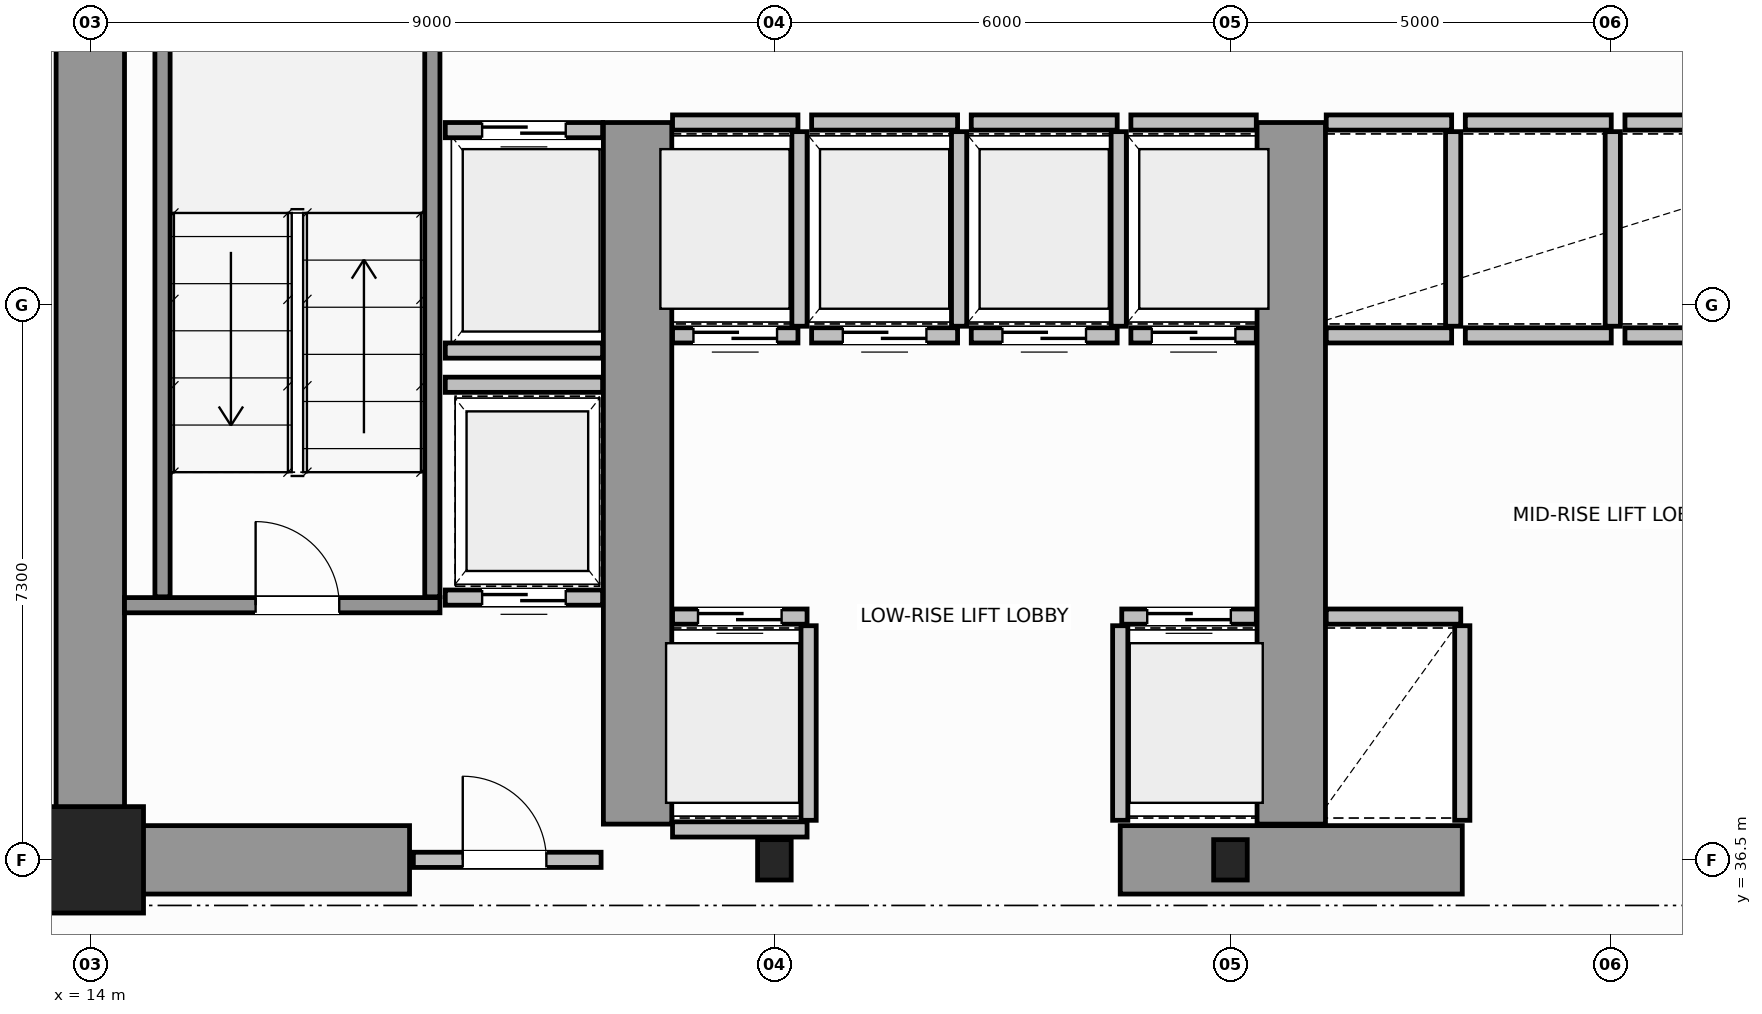
"""IFC4 building model, lengths in metres.
Left out: names, types, materials, properties, quantities, classifications, styles, units other than length and angle.
Written with IfcOpenShell. Run it as: python <this file> out.ifc"""

import sys

from ifc_helpers import new_model, si_unit, direction, frame, frame_2d, origin, origin_2d, place, context, subcontext, project, spatial, rectangle, i_section, extrude, source, transform, mapped, element, fill, save


model = new_model("IFC4")
c1 = context("Model", 3, precision=1e-05, world=origin(), true_north=direction((0.0, 1.0)))
c2 = subcontext(c1, "Body", "Model", "MODEL_VIEW")
j1 = project(units=[si_unit("LENGTHUNIT", "METRE"), si_unit("PLANEANGLEUNIT", "RADIAN")], contexts=[c1])
p1 = place(None, origin())
s1 = spatial("IfcSite", under=j1, at=p1, CompositionType="ELEMENT")
p2 = place(p1, origin())
s2 = spatial("IfcBuilding", under=s1, at=p2, CompositionType="ELEMENT")
p3 = place(p2, frame((0.0, 0.0, 72.0)))
s3 = spatial("IfcBuildingStorey", under=s2, at=p3, CompositionType="ELEMENT", Elevation=72.0)
m1 = source(origin(), c2, "Body", "SweptSolid", [
    extrude(rectangle(XDim=1.4, YDim=1.4, at=origin_2d()), origin(), (0.0, 0.0, 1.0), 3.8),
])
p4 = place(p3, frame((14.0, 36.5, 0.0), z_axis=(0.0, 0.0, 1.0), x_axis=(1.0, 0.0, 0.0)))
e1 = element("IfcColumn", 1, at=p4, inside=s3, PredefinedType="COLUMN", context=c2, shape_type="MappedRepresentation", body=[
    mapped(m1, transform((0.0, 0.0, 0.0), scale=1.0)),
])
m2 = source(origin(), c2, "Body", "SweptSolid", [
    extrude(i_section(OverallWidth=0.442, OverallDepth=0.531, WebThickness=0.065, FlangeThickness=0.076, FilletRadius=0.015, at=origin_2d()), origin(), (0.0, 0.0, 1.0), 3.8),
])
for number, where, z_axis, x_axis in (
    (2, (23.0, 36.5, 0.0), (0.0, 0.0, 1.0), (1.0, 0.0, 0.0)),
    (3, (29.0, 36.5, 0.0), (0.0, 0.0, 1.0), (1.0, 0.0, 0.0)),
):
    element("IfcColumn", number, at=place(p3, frame(where, z_axis=z_axis, x_axis=x_axis)), inside=s3, PredefinedType="COLUMN", context=c2, shape_type="MappedRepresentation", body=[
        mapped(m2, transform((0.0, 0.0, 0.0), scale=1.0)),
    ])
p5 = place(p3, frame((14.0, 36.5, 0.0), z_axis=(0.0, 0.0, 1.0), x_axis=(0.0, 1.0, 0.0)))
e4 = element("IfcWall", 4, at=p5, inside=s3, PredefinedType="SHEAR", context=c2, shape_type="SweptSolid", body=[
    extrude(rectangle(XDim=14.5, YDim=0.9, at=frame_2d((7.25, 0.0))), origin(), (0.0, 0.0, 1.0), 3.8),
])
p6 = place(p3, frame((14.47, 36.5, 0.0), z_axis=(0.0, 0.0, 1.0), x_axis=(1.0, 0.0, 0.0)))
e5 = element("IfcWall", 5, at=p6, inside=s3, PredefinedType="SHEAR", context=c2, shape_type="SweptSolid", body=[
    extrude(rectangle(XDim=3.73, YDim=0.9, at=frame_2d((1.865, 0.0))), origin(), (0.0, 0.0, 1.0), 2.38),
])
p7 = place(p3, frame((27.55, 36.5, 0.0), z_axis=(0.0, 0.0, 1.0), x_axis=(1.0, 0.0, 0.0)))
e6 = element("IfcWall", 6, at=p7, inside=s3, PredefinedType="SHEAR", context=c2, shape_type="SweptSolid", body=[
    extrude(rectangle(XDim=4.5, YDim=0.9, at=frame_2d((2.25, 0.0))), origin(), (0.0, 0.0, 1.0), 3.8),
])
for number, where, z_axis, x_axis in (
    (7, (21.2, 36.97, 0.0), (0.0, 0.0, 1.0), (0.0, 1.0, 0.0)),
    (8, (29.8, 36.97, 0.0), (0.0, 0.0, 1.0), (0.0, 1.0, 0.0)),
):
    element("IfcWall", number, at=place(p3, frame(where, z_axis=z_axis, x_axis=x_axis)), inside=s3, PredefinedType="SHEAR", context=c2, shape_type="SweptSolid", body=[
        extrude(rectangle(XDim=9.23, YDim=0.9, at=frame_2d((4.615, 0.0))), origin(), (0.0, 0.0, 1.0), 3.8),
    ])
p8 = place(p3, frame((14.45, 39.85, 0.0), z_axis=(0.0, 0.0, 1.0), x_axis=(1.0, 0.0, 0.0)))
e9 = element("IfcWall", 9, at=p8, inside=s3, PredefinedType="SOLIDWALL", context=c2, shape_type="SweptSolid", body=[
    extrude(rectangle(XDim=4.15, YDim=0.2, at=frame_2d((2.075, 0.0))), origin(), (0.0, 0.0, 1.0), 3.8),
])
p9 = place(p8, frame((1.725, 0.0, 0.0)))
e10 = element("IfcOpeningElement", 10, at=p9, cuts=e9, PredefinedType="OPENING", context=c2, shape_type="SweptSolid", body=[
    extrude(rectangle(XDim=1.1, YDim=2.15, at=frame_2d((0.55, 1.075))), frame((0.0, 0.11, 0.0), z_axis=(0.0, -1.0, 0.0), x_axis=(1.0, 0.0, 0.0)), (0.0, 0.0, 1.0), 0.22),
])
for number, where, z_axis, x_axis in (
    (11, (14.95, 39.96, 0.0), (0.0, 0.0, 1.0), (0.0, 1.0, 0.0)),
    (12, (18.5, 39.96, 0.0), (0.0, 0.0, 1.0), (0.0, 1.0, 0.0)),
):
    element("IfcWall", number, at=place(p3, frame(where, z_axis=z_axis, x_axis=x_axis)), inside=s3, PredefinedType="SOLIDWALL", context=c2, shape_type="SweptSolid", body=[
        extrude(rectangle(XDim=9.93, YDim=0.2, at=frame_2d((4.965, 0.0))), origin(), (0.0, 0.0, 1.0), 3.8),
    ])
p10 = place(p3, frame((18.25, 36.5, 0.0), z_axis=(0.0, 0.0, 1.0), x_axis=(1.0, 0.0, 0.0)))
e13 = element("IfcWall", 13, at=p10, inside=s3, PredefinedType="SOLIDWALL", context=c2, shape_type="SweptSolid", body=[
    extrude(rectangle(XDim=2.47, YDim=0.2, at=frame_2d((1.235, 0.0))), origin(), (0.0, 0.0, 1.0), 2.37),
])
p11 = place(p10, frame((0.65, 0.0, 0.0)))
e14 = element("IfcOpeningElement", 14, at=p11, cuts=e13, PredefinedType="OPENING", context=c2, shape_type="SweptSolid", body=[
    extrude(rectangle(XDim=1.1, YDim=2.15, at=frame_2d((0.55, 1.075))), frame((0.0, 0.11, 0.0), z_axis=(0.0, -1.0, 0.0), x_axis=(1.0, 0.0, 0.0)), (0.0, 0.0, 1.0), 0.22),
])
p12 = place(p3, frame((21.66, 39.7, 0.0), z_axis=(0.0, 0.0, 1.0), x_axis=(1.0, 0.0, 0.0)))
e15 = element("IfcWall", 15, at=p12, inside=s3, PredefinedType="SOLIDWALL", context=c2, shape_type="SweptSolid", body=[
    extrude(rectangle(XDim=1.77, YDim=0.2, at=frame_2d((0.885, 0.0))), origin(), (0.0, 0.0, 1.0), 3.58),
])
p13 = place(p12, frame((0.335, 0.0, 0.0)))
e16 = element("IfcOpeningElement", 16, at=p13, cuts=e15, PredefinedType="OPENING", context=c2, shape_type="SweptSolid", body=[
    extrude(rectangle(XDim=1.1, YDim=2.15, at=frame_2d((0.55, 1.075))), frame((0.0, 0.11, 0.0), z_axis=(0.0, -1.0, 0.0), x_axis=(1.0, 0.0, 0.0)), (0.0, 0.0, 1.0), 0.22),
])
p14 = place(p3, frame((21.66, 36.9, 0.0), z_axis=(0.0, 0.0, 1.0), x_axis=(1.0, 0.0, 0.0)))
e17 = element("IfcWall", 17, at=p14, inside=s3, PredefinedType="SOLIDWALL", context=c2, shape_type="SweptSolid", body=[
    extrude(rectangle(XDim=1.77, YDim=0.2, at=frame_2d((0.885, 0.0))), origin(), (0.0, 0.0, 1.0), 2.37),
])
p15 = place(p3, frame((23.45, 37.02, 0.0), z_axis=(0.0, 0.0, 1.0), x_axis=(0.0, 1.0, 0.0)))
e18 = element("IfcWall", 18, at=p15, inside=s3, PredefinedType="SOLIDWALL", context=c2, shape_type="SweptSolid", body=[
    extrude(rectangle(XDim=2.56, YDim=0.2, at=frame_2d((1.28, 0.0))), origin(), (0.0, 0.0, 1.0), 3.58),
])
p16 = place(p3, frame((27.57, 39.7, 0.0), z_axis=(0.0, 0.0, 1.0), x_axis=(1.0, 0.0, 0.0)))
e19 = element("IfcWall", 19, at=p16, inside=s3, PredefinedType="SOLIDWALL", context=c2, shape_type="SweptSolid", body=[
    extrude(rectangle(XDim=1.77, YDim=0.2, at=frame_2d((0.885, 0.0))), origin(), (0.0, 0.0, 1.0), 3.58),
])
p17 = place(p16, frame((0.335, 0.0, 0.0)))
e20 = element("IfcOpeningElement", 20, at=p17, cuts=e19, PredefinedType="OPENING", context=c2, shape_type="SweptSolid", body=[
    extrude(rectangle(XDim=1.1, YDim=2.15, at=frame_2d((0.55, 1.075))), frame((0.0, 0.11, 0.0), z_axis=(0.0, -1.0, 0.0), x_axis=(1.0, 0.0, 0.0)), (0.0, 0.0, 1.0), 0.22),
])
p18 = place(p3, frame((27.55, 37.02, 0.0), z_axis=(0.0, 0.0, 1.0), x_axis=(0.0, 1.0, 0.0)))
e21 = element("IfcWall", 21, at=p18, inside=s3, PredefinedType="SOLIDWALL", context=c2, shape_type="SweptSolid", body=[
    extrude(rectangle(XDim=2.56, YDim=0.2, at=frame_2d((1.28, 0.0))), origin(), (0.0, 0.0, 1.0), 3.58),
])
p19 = place(p3, frame((21.66, 43.4, 0.0), z_axis=(0.0, 0.0, 1.0), x_axis=(1.0, 0.0, 0.0)))
e22 = element("IfcWall", 22, at=p19, inside=s3, PredefinedType="SOLIDWALL", context=c2, shape_type="SweptSolid", body=[
    extrude(rectangle(XDim=1.65, YDim=0.2, at=frame_2d((0.825, 0.0))), origin(), (0.0, 0.0, 1.0), 3.58),
])
p20 = place(p19, frame((0.275, 0.0, 0.0)))
e23 = element("IfcOpeningElement", 23, at=p20, cuts=e22, PredefinedType="OPENING", context=c2, shape_type="SweptSolid", body=[
    extrude(rectangle(XDim=1.1, YDim=2.15, at=frame_2d((0.55, 1.075))), frame((0.0, 0.11, 0.0), z_axis=(0.0, -1.0, 0.0), x_axis=(1.0, 0.0, 0.0)), (0.0, 0.0, 1.0), 0.22),
])
p21 = place(p3, frame((21.66, 46.2, 0.0), z_axis=(0.0, 0.0, 1.0), x_axis=(1.0, 0.0, 0.0)))
e24 = element("IfcWall", 24, at=p21, inside=s3, PredefinedType="SOLIDWALL", context=c2, shape_type="SweptSolid", body=[
    extrude(rectangle(XDim=1.65, YDim=0.2, at=frame_2d((0.825, 0.0))), origin(), (0.0, 0.0, 1.0), 3.58),
])
p22 = place(p3, frame((23.33, 43.52, 0.0), z_axis=(0.0, 0.0, 1.0), x_axis=(0.0, 1.0, 0.0)))
e25 = element("IfcWall", 25, at=p22, inside=s3, PredefinedType="SOLIDWALL", context=c2, shape_type="SweptSolid", body=[
    extrude(rectangle(XDim=2.56, YDim=0.2, at=frame_2d((1.28, 0.0))), origin(), (0.0, 0.0, 1.0), 3.58),
])
p23 = place(p3, frame((23.49, 43.4, 0.0), z_axis=(0.0, 0.0, 1.0), x_axis=(1.0, 0.0, 0.0)))
e26 = element("IfcWall", 26, at=p23, inside=s3, PredefinedType="SOLIDWALL", context=c2, shape_type="SweptSolid", body=[
    extrude(rectangle(XDim=1.92, YDim=0.2, at=frame_2d((0.96, 0.0))), origin(), (0.0, 0.0, 1.0), 3.58),
])
p24 = place(p23, frame((0.41, 0.0, 0.0)))
e27 = element("IfcOpeningElement", 27, at=p24, cuts=e26, PredefinedType="OPENING", context=c2, shape_type="SweptSolid", body=[
    extrude(rectangle(XDim=1.1, YDim=2.15, at=frame_2d((0.55, 1.075))), frame((0.0, 0.11, 0.0), z_axis=(0.0, -1.0, 0.0), x_axis=(1.0, 0.0, 0.0)), (0.0, 0.0, 1.0), 0.22),
])
p25 = place(p3, frame((23.49, 46.2, 0.0), z_axis=(0.0, 0.0, 1.0), x_axis=(1.0, 0.0, 0.0)))
e28 = element("IfcWall", 28, at=p25, inside=s3, PredefinedType="SOLIDWALL", context=c2, shape_type="SweptSolid", body=[
    extrude(rectangle(XDim=1.92, YDim=0.2, at=frame_2d((0.96, 0.0))), origin(), (0.0, 0.0, 1.0), 3.58),
])
p26 = place(p3, frame((25.43, 43.52, 0.0), z_axis=(0.0, 0.0, 1.0), x_axis=(0.0, 1.0, 0.0)))
e29 = element("IfcWall", 29, at=p26, inside=s3, PredefinedType="SOLIDWALL", context=c2, shape_type="SweptSolid", body=[
    extrude(rectangle(XDim=2.56, YDim=0.2, at=frame_2d((1.28, 0.0))), origin(), (0.0, 0.0, 1.0), 3.58),
])
p27 = place(p3, frame((25.59, 43.4, 0.0), z_axis=(0.0, 0.0, 1.0), x_axis=(1.0, 0.0, 0.0)))
e30 = element("IfcWall", 30, at=p27, inside=s3, PredefinedType="SOLIDWALL", context=c2, shape_type="SweptSolid", body=[
    extrude(rectangle(XDim=1.92, YDim=0.2, at=frame_2d((0.96, 0.0))), origin(), (0.0, 0.0, 1.0), 3.58),
])
p28 = place(p27, frame((0.41, 0.0, 0.0)))
e31 = element("IfcOpeningElement", 31, at=p28, cuts=e30, PredefinedType="OPENING", context=c2, shape_type="SweptSolid", body=[
    extrude(rectangle(XDim=1.1, YDim=2.15, at=frame_2d((0.55, 1.075))), frame((0.0, 0.11, 0.0), z_axis=(0.0, -1.0, 0.0), x_axis=(1.0, 0.0, 0.0)), (0.0, 0.0, 1.0), 0.22),
])
p29 = place(p3, frame((25.59, 46.2, 0.0), z_axis=(0.0, 0.0, 1.0), x_axis=(1.0, 0.0, 0.0)))
e32 = element("IfcWall", 32, at=p29, inside=s3, PredefinedType="SOLIDWALL", context=c2, shape_type="SweptSolid", body=[
    extrude(rectangle(XDim=1.92, YDim=0.2, at=frame_2d((0.96, 0.0))), origin(), (0.0, 0.0, 1.0), 3.58),
])
p30 = place(p3, frame((27.53, 43.52, 0.0), z_axis=(0.0, 0.0, 1.0), x_axis=(0.0, 1.0, 0.0)))
e33 = element("IfcWall", 33, at=p30, inside=s3, PredefinedType="SOLIDWALL", context=c2, shape_type="SweptSolid", body=[
    extrude(rectangle(XDim=2.56, YDim=0.2, at=frame_2d((1.28, 0.0))), origin(), (0.0, 0.0, 1.0), 3.58),
])
p31 = place(p3, frame((27.69, 43.4, 0.0), z_axis=(0.0, 0.0, 1.0), x_axis=(1.0, 0.0, 0.0)))
e34 = element("IfcWall", 34, at=p31, inside=s3, PredefinedType="SOLIDWALL", context=c2, shape_type="SweptSolid", body=[
    extrude(rectangle(XDim=1.65, YDim=0.2, at=frame_2d((0.825, 0.0))), origin(), (0.0, 0.0, 1.0), 3.58),
])
p32 = place(p31, frame((0.275, 0.0, 0.0)))
e35 = element("IfcOpeningElement", 35, at=p32, cuts=e34, PredefinedType="OPENING", context=c2, shape_type="SweptSolid", body=[
    extrude(rectangle(XDim=1.1, YDim=2.15, at=frame_2d((0.55, 1.075))), frame((0.0, 0.11, 0.0), z_axis=(0.0, -1.0, 0.0), x_axis=(1.0, 0.0, 0.0)), (0.0, 0.0, 1.0), 0.22),
])
p33 = place(p3, frame((27.69, 46.2, 0.0), z_axis=(0.0, 0.0, 1.0), x_axis=(1.0, 0.0, 0.0)))
e36 = element("IfcWall", 36, at=p33, inside=s3, PredefinedType="SOLIDWALL", context=c2, shape_type="SweptSolid", body=[
    extrude(rectangle(XDim=1.65, YDim=0.2, at=frame_2d((0.825, 0.0))), origin(), (0.0, 0.0, 1.0), 3.58),
])
p34 = place(p3, frame((30.26, 39.7, 0.0), z_axis=(0.0, 0.0, 1.0), x_axis=(1.0, 0.0, 0.0)))
e37 = element("IfcWall", 37, at=p34, inside=s3, PredefinedType="SOLIDWALL", context=c2, shape_type="SweptSolid", body=[
    extrude(rectangle(XDim=1.77, YDim=0.2, at=frame_2d((0.885, 0.0))), origin(), (0.0, 0.0, 1.0), 3.58),
])
p35 = place(p3, frame((32.05, 37.02, 0.0), z_axis=(0.0, 0.0, 1.0), x_axis=(0.0, 1.0, 0.0)))
e38 = element("IfcWall", 38, at=p35, inside=s3, PredefinedType="SOLIDWALL", context=c2, shape_type="SweptSolid", body=[
    extrude(rectangle(XDim=2.56, YDim=0.2, at=frame_2d((1.28, 0.0))), origin(), (0.0, 0.0, 1.0), 3.58),
])
for number, where, z_axis, x_axis in (
    (39, (30.26, 43.4, 0.0), (0.0, 0.0, 1.0), (1.0, 0.0, 0.0)),
    (40, (30.26, 46.2, 0.0), (0.0, 0.0, 1.0), (1.0, 0.0, 0.0)),
):
    element("IfcWall", number, at=place(p3, frame(where, z_axis=z_axis, x_axis=x_axis)), inside=s3, PredefinedType="SOLIDWALL", context=c2, shape_type="SweptSolid", body=[
        extrude(rectangle(XDim=1.65, YDim=0.2, at=frame_2d((0.825, 0.0))), origin(), (0.0, 0.0, 1.0), 3.58),
    ])
p36 = place(p3, frame((31.93, 43.52, 0.0), z_axis=(0.0, 0.0, 1.0), x_axis=(0.0, 1.0, 0.0)))
e41 = element("IfcWall", 41, at=p36, inside=s3, PredefinedType="SOLIDWALL", context=c2, shape_type="SweptSolid", body=[
    extrude(rectangle(XDim=2.56, YDim=0.2, at=frame_2d((1.28, 0.0))), origin(), (0.0, 0.0, 1.0), 3.58),
])
for number, where, z_axis, x_axis in (
    (42, (32.09, 43.4, 0.0), (0.0, 0.0, 1.0), (1.0, 0.0, 0.0)),
    (43, (32.09, 46.2, 0.0), (0.0, 0.0, 1.0), (1.0, 0.0, 0.0)),
):
    element("IfcWall", number, at=place(p3, frame(where, z_axis=z_axis, x_axis=x_axis)), inside=s3, PredefinedType="SOLIDWALL", context=c2, shape_type="SweptSolid", body=[
        extrude(rectangle(XDim=1.92, YDim=0.2, at=frame_2d((0.96, 0.0))), origin(), (0.0, 0.0, 1.0), 3.58),
    ])
p37 = place(p3, frame((34.03, 43.52, 0.0), z_axis=(0.0, 0.0, 1.0), x_axis=(0.0, 1.0, 0.0)))
e44 = element("IfcWall", 44, at=p37, inside=s3, PredefinedType="SOLIDWALL", context=c2, shape_type="SweptSolid", body=[
    extrude(rectangle(XDim=2.56, YDim=0.2, at=frame_2d((1.28, 0.0))), origin(), (0.0, 0.0, 1.0), 3.58),
])
for number, where, z_axis, x_axis in (
    (45, (34.19, 43.4, 0.0), (0.0, 0.0, 1.0), (1.0, 0.0, 0.0)),
    (46, (34.19, 46.2, 0.0), (0.0, 0.0, 1.0), (1.0, 0.0, 0.0)),
):
    element("IfcWall", number, at=place(p3, frame(where, z_axis=z_axis, x_axis=x_axis)), inside=s3, PredefinedType="SOLIDWALL", context=c2, shape_type="SweptSolid", body=[
        extrude(rectangle(XDim=1.92, YDim=0.2, at=frame_2d((0.96, 0.0))), origin(), (0.0, 0.0, 1.0), 3.58),
    ])
p38 = place(p3, frame((18.67, 46.1, 0.0), z_axis=(0.0, 0.0, 1.0), x_axis=(1.0, 0.0, 0.0)))
e47 = element("IfcWall", 47, at=p38, inside=s3, PredefinedType="SOLIDWALL", context=c2, shape_type="SweptSolid", body=[
    extrude(rectangle(XDim=2.07, YDim=0.2, at=frame_2d((1.035, 0.0))), origin(), (0.0, 0.0, 1.0), 3.58),
])
p39 = place(p38, frame((0.485, 0.0, 0.0)))
e48 = element("IfcOpeningElement", 48, at=p39, cuts=e47, PredefinedType="OPENING", context=c2, shape_type="SweptSolid", body=[
    extrude(rectangle(XDim=1.1, YDim=2.15, at=frame_2d((0.55, 1.075))), frame((0.0, 0.11, 0.0), z_axis=(0.0, -1.0, 0.0), x_axis=(1.0, 0.0, 0.0)), (0.0, 0.0, 1.0), 0.22),
])
p40 = place(p3, frame((18.67, 43.2, 0.0), z_axis=(0.0, 0.0, 1.0), x_axis=(1.0, 0.0, 0.0)))
e49 = element("IfcWall", 49, at=p40, inside=s3, PredefinedType="SOLIDWALL", context=c2, shape_type="SweptSolid", body=[
    extrude(rectangle(XDim=2.07, YDim=0.2, at=frame_2d((1.035, 0.0))), origin(), (0.0, 0.0, 1.0), 3.58),
])
p41 = place(p3, frame((18.67, 39.95, 0.0), z_axis=(0.0, 0.0, 1.0), x_axis=(1.0, 0.0, 0.0)))
e50 = element("IfcWall", 50, at=p41, inside=s3, PredefinedType="SOLIDWALL", context=c2, shape_type="SweptSolid", body=[
    extrude(rectangle(XDim=2.07, YDim=0.2, at=frame_2d((1.035, 0.0))), origin(), (0.0, 0.0, 1.0), 3.58),
])
p42 = place(p41, frame((0.485, 0.0, 0.0)))
e51 = element("IfcOpeningElement", 51, at=p42, cuts=e50, PredefinedType="OPENING", context=c2, shape_type="SweptSolid", body=[
    extrude(rectangle(XDim=1.1, YDim=2.15, at=frame_2d((0.55, 1.075))), frame((0.0, 0.11, 0.0), z_axis=(0.0, -1.0, 0.0), x_axis=(1.0, 0.0, 0.0)), (0.0, 0.0, 1.0), 0.22),
])
p43 = place(p3, frame((18.67, 42.75, 0.0), z_axis=(0.0, 0.0, 1.0), x_axis=(1.0, 0.0, 0.0)))
e52 = element("IfcWall", 52, at=p43, inside=s3, PredefinedType="SOLIDWALL", context=c2, shape_type="SweptSolid", body=[
    extrude(rectangle(XDim=2.07, YDim=0.2, at=frame_2d((1.035, 0.0))), origin(), (0.0, 0.0, 1.0), 3.58),
])
p44 = place(p3, frame((7.277, 36.48, 0.0), z_axis=(0.0, 0.0, 1.0), x_axis=(1.0, 0.0, 0.0)))
e53 = element("IfcWall", 53, at=p44, inside=s3, PredefinedType="PARTITIONING", context=c2, shape_type="SweptSolid", body=[
    extrude(rectangle(XDim=6.663, YDim=0.12, at=frame_2d((3.332, 0.0))), origin(), (0.0, 0.0, 1.0), 2.77),
])
p45 = place(p44, frame((2.881, 0.0, 0.0)))
e54 = element("IfcOpeningElement", 54, at=p45, cuts=e53, PredefinedType="OPENING", context=c2, shape_type="SweptSolid", body=[
    extrude(rectangle(XDim=0.9, YDim=2.15, at=frame_2d((0.45, 1.075))), frame((0.0, 0.07, 0.0), z_axis=(0.0, -1.0, 0.0), x_axis=(1.0, 0.0, 0.0)), (0.0, 0.0, 1.0), 0.14),
])
m3 = source(origin(), c2, "Body", "SweptSolid", [
    extrude(rectangle(XDim=1.1, YDim=2.15, at=frame_2d((0.55, 1.075))), frame((0.0, 0.025, 0.0), z_axis=(0.0, -1.0, 0.0), x_axis=(1.0, 0.0, 0.0)), (0.0, 0.0, 1.0), 0.05),
])
p46 = place(p9, origin())
e55 = element("IfcDoor", 55, at=p46, inside=s3, OperationType="SINGLE_SWING_LEFT", PredefinedType="DOOR", context=c2, shape_type="MappedRepresentation", body=[
    mapped(m3, transform((0.0, 0.0, 0.0), scale=1.0)),
])
fill(e10, e55)
p47 = place(p11, origin())
e56 = element("IfcDoor", 56, at=p47, inside=s3, OperationType="SINGLE_SWING_RIGHT", PredefinedType="DOOR", context=c2, shape_type="MappedRepresentation", body=[
    mapped(m3, transform((0.0, 0.0, 0.0), scale=1.0)),
])
fill(e14, e56)
p48 = place(p13, origin())
e57 = element("IfcDoor", 57, at=p48, inside=s3, OperationType="DOUBLE_DOOR_SLIDING", PredefinedType="DOOR", context=c2, shape_type="MappedRepresentation", body=[
    mapped(m3, transform((0.0, 0.0, 0.0), scale=1.0)),
])
fill(e16, e57)
p49 = place(p17, origin())
e58 = element("IfcDoor", 58, at=p49, inside=s3, OperationType="DOUBLE_DOOR_SLIDING", PredefinedType="DOOR", context=c2, shape_type="MappedRepresentation", body=[
    mapped(m3, transform((0.0, 0.0, 0.0), scale=1.0)),
])
fill(e20, e58)
p50 = place(p20, origin())
e59 = element("IfcDoor", 59, at=p50, inside=s3, OperationType="DOUBLE_DOOR_SLIDING", PredefinedType="DOOR", context=c2, shape_type="MappedRepresentation", body=[
    mapped(m3, transform((0.0, 0.0, 0.0), scale=1.0)),
])
fill(e23, e59)
p51 = place(p24, origin())
e60 = element("IfcDoor", 60, at=p51, inside=s3, OperationType="DOUBLE_DOOR_SLIDING", PredefinedType="DOOR", context=c2, shape_type="MappedRepresentation", body=[
    mapped(m3, transform((0.0, 0.0, 0.0), scale=1.0)),
])
fill(e27, e60)
p52 = place(p28, origin())
e61 = element("IfcDoor", 61, at=p52, inside=s3, OperationType="DOUBLE_DOOR_SLIDING", PredefinedType="DOOR", context=c2, shape_type="MappedRepresentation", body=[
    mapped(m3, transform((0.0, 0.0, 0.0), scale=1.0)),
])
fill(e31, e61)
p53 = place(p32, origin())
e62 = element("IfcDoor", 62, at=p53, inside=s3, OperationType="DOUBLE_DOOR_SLIDING", PredefinedType="DOOR", context=c2, shape_type="MappedRepresentation", body=[
    mapped(m3, transform((0.0, 0.0, 0.0), scale=1.0)),
])
fill(e35, e62)
p54 = place(p39, origin())
e63 = element("IfcDoor", 63, at=p54, inside=s3, OperationType="DOUBLE_DOOR_SLIDING", PredefinedType="DOOR", context=c2, shape_type="MappedRepresentation", body=[
    mapped(m3, transform((0.0, 0.0, 0.0), scale=1.0)),
])
fill(e48, e63)
p55 = place(p42, origin())
e64 = element("IfcDoor", 64, at=p55, inside=s3, OperationType="DOUBLE_DOOR_SLIDING", PredefinedType="DOOR", context=c2, shape_type="MappedRepresentation", body=[
    mapped(m3, transform((0.0, 0.0, 0.0), scale=1.0)),
])
fill(e51, e64)
save(model, sys.argv[1])
